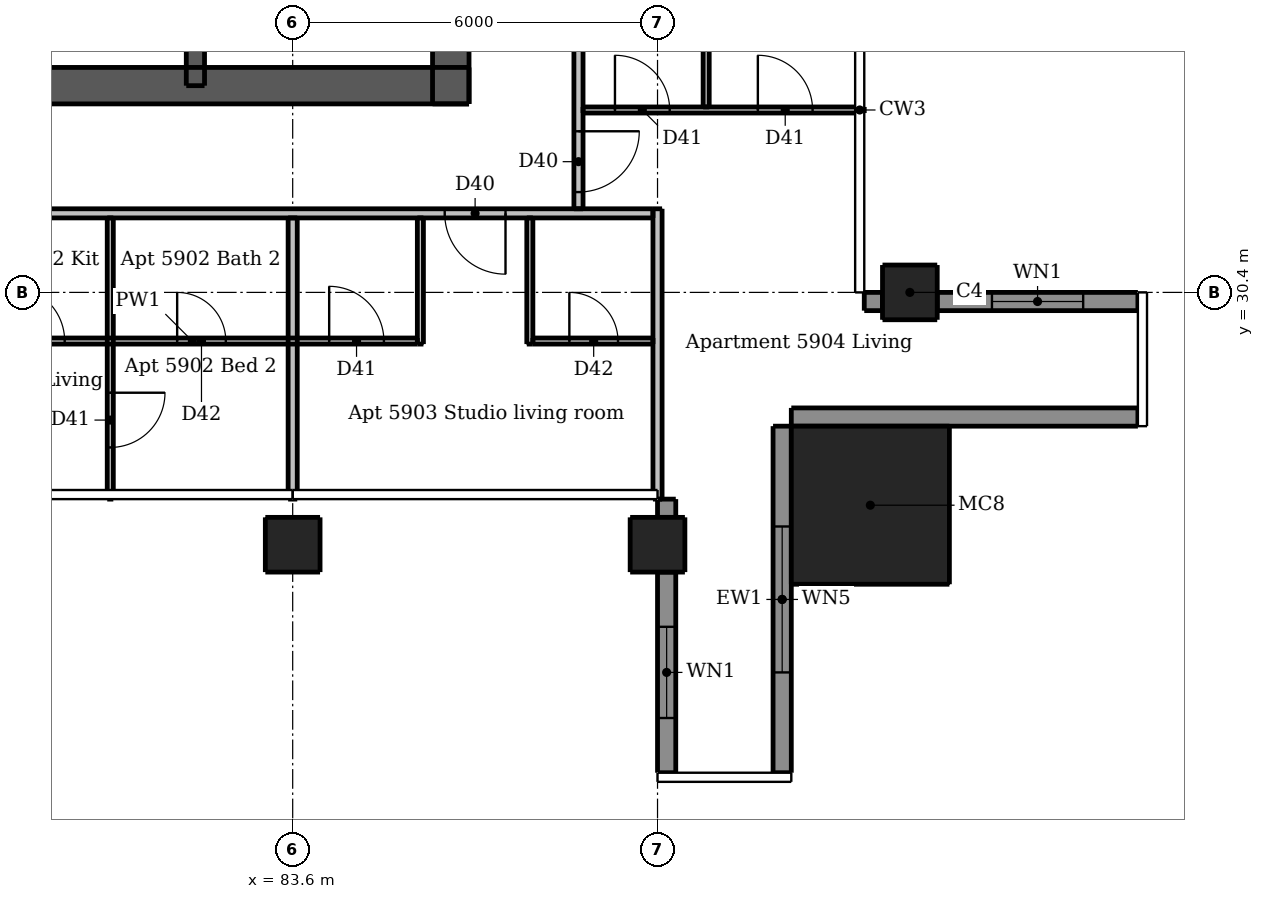
"""IFC4 building model, lengths in metres.
Left out: names, types, materials, properties, quantities, classifications, styles, units other than length and angle.
Written with IfcOpenShell. Run it as: python <this file> out.ifc"""

import sys

from ifc_helpers import new_model, si_unit, direction, frame, frame_2d, origin, origin_2d, place, context, subcontext, project, spatial, rectangle, extrude, element, fill, save


model = new_model("IFC4")
c1 = context("Model", 3, precision=1e-05, world=origin(), true_north=direction((0.0, 1.0)))
c2 = subcontext(c1, "Body", "Model", "MODEL_VIEW")
j1 = project(units=[si_unit("LENGTHUNIT", "METRE"), si_unit("PLANEANGLEUNIT", "RADIAN")], contexts=[c1])
p1 = place(None, origin())
s1 = spatial("IfcSite", under=j1, at=p1, CompositionType="ELEMENT")
p2 = place(p1, origin())
s2 = spatial("IfcBuilding", under=s1, at=p2, CompositionType="ELEMENT")
p3 = place(p2, frame((0.0, 0.0, 220.0)))
s3 = spatial("IfcBuildingStorey", under=s2, at=p3, CompositionType="ELEMENT", Elevation=220.0)
p4 = place(p3, frame((62.5, 33.8, 0.0), z_axis=(0.0, 0.0, 1.0), x_axis=(1.0, 0.0, 0.0)))
e1 = element("IfcWall", 1, at=p4, inside=s3, PredefinedType="SHEAR", context=c2, shape_type="SweptSolid", body=[
    extrude(rectangle(XDim=24.0, YDim=0.6, at=frame_2d((12.0, 0.0))), origin(), (0.0, 0.0, 1.0), 3.05),
])
p5 = place(p4, frame((1.925, 0.0, 0.0)))
e2 = element("IfcOpeningElement", 2, at=p5, cuts=e1, PredefinedType="OPENING", context=c2, shape_type="SweptSolid", body=[
    extrude(rectangle(XDim=1.1, YDim=2.1, at=frame_2d((0.55, 1.05))), frame((0.0, 0.31, 0.0), z_axis=(0.0, -1.0, 0.0), x_axis=(1.0, 0.0, 0.0)), (0.0, 0.0, 1.0), 0.62),
])
p6 = place(p4, frame((20.975, 0.0, 0.0)))
e3 = element("IfcOpeningElement", 3, at=p6, cuts=e1, PredefinedType="OPENING", context=c2, shape_type="SweptSolid", body=[
    extrude(rectangle(XDim=1.1, YDim=2.1, at=frame_2d((0.55, 1.05))), frame((0.0, 0.31, 0.0), z_axis=(0.0, -1.0, 0.0), x_axis=(1.0, 0.0, 0.0)), (0.0, 0.0, 1.0), 0.62),
])
p7 = place(p4, frame((8.0, 0.0, 0.0)))
e4 = element("IfcOpeningElement", 4, at=p7, cuts=e1, PredefinedType="OPENING", context=c2, shape_type="SweptSolid", body=[
    extrude(rectangle(XDim=1.1, YDim=2.1, at=frame_2d((0.55, 1.05))), frame((0.0, 0.31, 0.0), z_axis=(0.0, -1.0, 0.0), x_axis=(1.0, 0.0, 0.0)), (0.0, 0.0, 1.0), 0.62),
])
p8 = place(p4, frame((17.512, 0.0, 0.0)))
e5 = element("IfcOpeningElement", 5, at=p8, cuts=e1, PredefinedType="OPENING", context=c2, shape_type="SweptSolid", body=[
    extrude(rectangle(XDim=0.9, YDim=2.1, at=frame_2d((0.45, 1.05))), frame((0.0, 0.31, 0.0), z_axis=(0.0, -1.0, 0.0), x_axis=(1.0, 0.0, 0.0)), (0.0, 0.0, 1.0), 0.62),
])
p9 = place(p3, frame((86.2, 33.5, 0.0), z_axis=(0.0, 0.0, 1.0), x_axis=(0.0, 1.0, 0.0)))
e6 = element("IfcWall", 6, at=p9, inside=s3, PredefinedType="SHEAR", context=c2, shape_type="SweptSolid", body=[
    extrude(rectangle(XDim=24.0, YDim=0.6, at=frame_2d((12.0, 0.0))), origin(), (0.0, 0.0, 1.0), 3.05),
])
p10 = place(p9, frame((11.2, 0.0, 0.0)))
e7 = element("IfcOpeningElement", 7, at=p10, cuts=e6, PredefinedType="OPENING", context=c2, shape_type="SweptSolid", body=[
    extrude(rectangle(XDim=1.6, YDim=2.1, at=frame_2d((0.8, 1.05))), frame((0.0, 0.31, 0.0), z_axis=(0.0, -1.0, 0.0), x_axis=(1.0, 0.0, 0.0)), (0.0, 0.0, 1.0), 0.62),
])
p11 = place(p3, frame((82.0, 33.8, 0.0), z_axis=(0.0, 0.0, 1.0), x_axis=(0.0, 1.0, 0.0)))
e8 = element("IfcWall", 8, at=p11, inside=s3, PredefinedType="SHEAR", context=c2, shape_type="SweptSolid", body=[
    extrude(rectangle(XDim=10.1, YDim=0.3, at=frame_2d((5.05, 0.0))), origin(), (0.0, 0.0, 1.0), 3.05),
])
for number, where, z_axis, x_axis in (
    (9, (83.6, 26.25, 0.0), (0.0, 0.0, 1.0), (1.0, 0.0, 0.0)),
    (10, (89.6, 26.25, 0.0), (0.0, 0.0, 1.0), (1.0, 0.0, 0.0)),
    (11, (93.75, 30.4, 0.0), (0.0, 0.0, 1.0), (1.0, 0.0, 0.0)),
):
    element("IfcColumn", number, at=place(p3, frame(where, z_axis=z_axis, x_axis=x_axis)), inside=s3, PredefinedType="COLUMN", context=c2, shape_type="SweptSolid", body=[
        extrude(rectangle(XDim=0.9, YDim=0.9, at=origin_2d()), origin(), (0.0, 0.0, 1.0), 3.05),
    ])
p12 = place(p3, frame((93.1, 26.9, 0.0), z_axis=(0.0, 0.0, 1.0), x_axis=(1.0, 0.0, 0.0)))
e12 = element("IfcColumn", 12, at=p12, inside=s3, PredefinedType="COLUMN", context=c2, shape_type="SweptSolid", body=[
    extrude(rectangle(XDim=2.6, YDim=2.6, at=origin_2d()), origin(), (0.0, 0.0, 1.0), 3.3),
])
p13 = place(p3, frame((89.75, 27.0, 0.0), z_axis=(0.0, 0.0, 1.0), x_axis=(0.0, -1.0, 0.0)))
e13 = element("IfcWall", 13, at=p13, inside=s3, PredefinedType="SOLIDWALL", context=c2, shape_type="SweptSolid", body=[
    extrude(rectangle(XDim=0.3, YDim=0.3, at=frame_2d((0.15, 0.0))), origin(), (0.0, 0.0, 1.0), 3.05),
])
p14 = place(p3, frame((89.75, 25.8, 0.0), z_axis=(0.0, 0.0, 1.0), x_axis=(0.0, -1.0, 0.0)))
e14 = element("IfcWall", 14, at=p14, inside=s3, PredefinedType="SOLIDWALL", context=c2, shape_type="SweptSolid", body=[
    extrude(rectangle(XDim=3.3, YDim=0.3, at=frame_2d((1.65, 0.0))), origin(), (0.0, 0.0, 1.0), 3.05),
])
p15 = place(p14, frame((0.9, 0.0, 0.9)))
e15 = element("IfcOpeningElement", 15, at=p15, cuts=e14, PredefinedType="OPENING", context=c2, shape_type="SweptSolid", body=[
    extrude(rectangle(XDim=1.5, YDim=1.5, at=frame_2d((0.75, 0.75))), frame((0.0, 0.16, 0.0), z_axis=(0.0, -1.0, 0.0), x_axis=(1.0, 0.0, 0.0)), (0.0, 0.0, 1.0), 0.32),
])
p16 = place(p3, frame((91.65, 22.5, 0.0), z_axis=(0.0, 0.0, 1.0), x_axis=(0.0, 1.0, 0.0)))
e16 = element("IfcWall", 16, at=p16, inside=s3, PredefinedType="SOLIDWALL", context=c2, shape_type="SweptSolid", body=[
    extrude(rectangle(XDim=5.7, YDim=0.3, at=frame_2d((2.85, 0.0))), origin(), (0.0, 0.0, 1.0), 3.05),
])
p17 = place(p16, frame((1.65, 0.0, 0.15)))
e17 = element("IfcOpeningElement", 17, at=p17, cuts=e16, PredefinedType="OPENING", context=c2, shape_type="SweptSolid", body=[
    extrude(rectangle(XDim=2.4, YDim=2.1, at=frame_2d((1.2, 1.05))), frame((0.0, 0.16, 0.0), z_axis=(0.0, -1.0, 0.0), x_axis=(1.0, 0.0, 0.0)), (0.0, 0.0, 1.0), 0.32),
])
p18 = place(p3, frame((91.8, 28.35, 0.0), z_axis=(0.0, 0.0, 1.0), x_axis=(1.0, 0.0, 0.0)))
e18 = element("IfcWall", 18, at=p18, inside=s3, PredefinedType="SOLIDWALL", context=c2, shape_type="SweptSolid", body=[
    extrude(rectangle(XDim=5.7, YDim=0.3, at=frame_2d((2.85, 0.0))), origin(), (0.0, 0.0, 1.0), 3.05),
])
p19 = place(p3, frame((97.5, 30.25, 0.0), z_axis=(0.0, 0.0, 1.0), x_axis=(-1.0, 0.0, 0.0)))
e19 = element("IfcWall", 19, at=p19, inside=s3, PredefinedType="SOLIDWALL", context=c2, shape_type="SweptSolid", body=[
    extrude(rectangle(XDim=3.3, YDim=0.3, at=frame_2d((1.65, 0.0))), origin(), (0.0, 0.0, 1.0), 3.05),
])
p20 = place(p19, frame((0.9, 0.0, 0.9)))
e20 = element("IfcOpeningElement", 20, at=p20, cuts=e19, PredefinedType="OPENING", context=c2, shape_type="SweptSolid", body=[
    extrude(rectangle(XDim=1.5, YDim=1.5, at=frame_2d((0.75, 0.75))), frame((0.0, 0.16, 0.0), z_axis=(0.0, -1.0, 0.0), x_axis=(1.0, 0.0, 0.0)), (0.0, 0.0, 1.0), 0.32),
])
p21 = place(p3, frame((93.3, 30.25, 0.0), z_axis=(0.0, 0.0, 1.0), x_axis=(-1.0, 0.0, 0.0)))
e21 = element("IfcWall", 21, at=p21, inside=s3, PredefinedType="SOLIDWALL", context=c2, shape_type="SweptSolid", body=[
    extrude(rectangle(XDim=0.3, YDim=0.3, at=frame_2d((0.15, 0.0))), origin(), (0.0, 0.0, 1.0), 3.05),
])
p22 = place(p3, frame((80.6, 31.625, 0.0), z_axis=(0.0, 0.0, 1.0), x_axis=(0.0, -1.0, 0.0)))
e22 = element("IfcWall", 22, at=p22, inside=s3, PredefinedType="PARTITIONING", context=c2, shape_type="SweptSolid", body=[
    extrude(rectangle(XDim=4.625, YDim=0.1, at=frame_2d((2.312, 0.0))), origin(), (0.0, 0.0, 1.0), 3.05),
])
p23 = place(p22, frame((2.875, 0.0, 0.0)))
e23 = element("IfcOpeningElement", 23, at=p23, cuts=e22, PredefinedType="OPENING", context=c2, shape_type="SweptSolid", body=[
    extrude(rectangle(XDim=0.9, YDim=2.1, at=frame_2d((0.45, 1.05))), frame((0.0, 0.06, 0.0), z_axis=(0.0, -1.0, 0.0), x_axis=(1.0, 0.0, 0.0)), (0.0, 0.0, 1.0), 0.12),
])
for number, where, z_axis, x_axis in (
    (24, (85.7, 29.55, 0.0), (0.0, 0.0, 1.0), (0.0, 1.0, 0.0)),
    (25, (87.5, 29.55, 0.0), (0.0, 0.0, 1.0), (0.0, 1.0, 0.0)),
):
    element("IfcWall", number, at=place(p3, frame(where, z_axis=z_axis, x_axis=x_axis)), inside=s3, PredefinedType="PARTITIONING", context=c2, shape_type="SweptSolid", body=[
        extrude(rectangle(XDim=2.075, YDim=0.1, at=frame_2d((1.038, 0.0))), origin(), (0.0, 0.0, 1.0), 3.05),
    ])
p24 = place(p3, frame((90.4, 33.45, 0.0), z_axis=(0.0, 0.0, 1.0), x_axis=(0.0, 1.0, 0.0)))
e26 = element("IfcWall", 26, at=p24, inside=s3, PredefinedType="PARTITIONING", context=c2, shape_type="SweptSolid", body=[
    extrude(rectangle(XDim=9.0, YDim=0.1, at=frame_2d((4.5, 0.0))), origin(), (0.0, 0.0, 1.0), 3.05),
])
p25 = place(p24, frame((3.75, 0.0, 0.0)))
e27 = element("IfcOpeningElement", 27, at=p25, cuts=e26, PredefinedType="OPENING", context=c2, shape_type="SweptSolid", body=[
    extrude(rectangle(XDim=0.8, YDim=2.1, at=frame_2d((0.4, 1.05))), frame((0.0, 0.06, 0.0), z_axis=(0.0, -1.0, 0.0), x_axis=(1.0, 0.0, 0.0)), (0.0, 0.0, 1.0), 0.12),
])
p26 = place(p24, frame((7.0, 0.0, 0.0)))
e28 = element("IfcOpeningElement", 28, at=p26, cuts=e26, PredefinedType="OPENING", context=c2, shape_type="SweptSolid", body=[
    extrude(rectangle(XDim=0.9, YDim=2.1, at=frame_2d((0.45, 1.05))), frame((0.0, 0.06, 0.0), z_axis=(0.0, -1.0, 0.0), x_axis=(1.0, 0.0, 0.0)), (0.0, 0.0, 1.0), 0.12),
])
p27 = place(p3, frame((88.375, 33.4, 0.0), z_axis=(0.0, 0.0, 1.0), x_axis=(1.0, 0.0, 0.0)))
e29 = element("IfcWall", 29, at=p27, inside=s3, PredefinedType="PARTITIONING", context=c2, shape_type="SweptSolid", body=[
    extrude(rectangle(XDim=4.625, YDim=0.1, at=frame_2d((2.312, 0.0))), origin(), (0.0, 0.0, 1.0), 3.05),
])
p28 = place(p27, frame((0.525, 0.0, 0.0)))
e30 = element("IfcOpeningElement", 30, at=p28, cuts=e29, PredefinedType="OPENING", context=c2, shape_type="SweptSolid", body=[
    extrude(rectangle(XDim=0.9, YDim=2.1, at=frame_2d((0.45, 1.05))), frame((0.0, 0.06, 0.0), z_axis=(0.0, -1.0, 0.0), x_axis=(1.0, 0.0, 0.0)), (0.0, 0.0, 1.0), 0.12),
])
p29 = place(p27, frame((2.875, 0.0, 0.0)))
e31 = element("IfcOpeningElement", 31, at=p29, cuts=e29, PredefinedType="OPENING", context=c2, shape_type="SweptSolid", body=[
    extrude(rectangle(XDim=0.9, YDim=2.1, at=frame_2d((0.45, 1.05))), frame((0.0, 0.06, 0.0), z_axis=(0.0, -1.0, 0.0), x_axis=(1.0, 0.0, 0.0)), (0.0, 0.0, 1.0), 0.12),
])
p30 = place(p3, frame((78.25, 29.6, 0.0), z_axis=(0.0, 0.0, 1.0), x_axis=(1.0, 0.0, 0.0)))
e32 = element("IfcWall", 32, at=p30, inside=s3, PredefinedType="PARTITIONING", context=c2, shape_type="SweptSolid", body=[
    extrude(rectangle(XDim=7.4, YDim=0.1, at=frame_2d((3.7, 0.0))), origin(), (0.0, 0.0, 1.0), 3.05),
])
p31 = place(p30, frame((0.7, 0.0, 0.0)))
e33 = element("IfcOpeningElement", 33, at=p31, cuts=e32, PredefinedType="OPENING", context=c2, shape_type="SweptSolid", body=[
    extrude(rectangle(XDim=0.9, YDim=2.1, at=frame_2d((0.45, 1.05))), frame((0.0, 0.06, 0.0), z_axis=(0.0, -1.0, 0.0), x_axis=(1.0, 0.0, 0.0)), (0.0, 0.0, 1.0), 0.12),
])
p32 = place(p30, frame((3.45, 0.0, 0.0)))
e34 = element("IfcOpeningElement", 34, at=p32, cuts=e32, PredefinedType="OPENING", context=c2, shape_type="SweptSolid", body=[
    extrude(rectangle(XDim=0.8, YDim=2.1, at=frame_2d((0.4, 1.05))), frame((0.0, 0.06, 0.0), z_axis=(0.0, -1.0, 0.0), x_axis=(1.0, 0.0, 0.0)), (0.0, 0.0, 1.0), 0.12),
])
p33 = place(p30, frame((5.95, 0.0, 0.0)))
e35 = element("IfcOpeningElement", 35, at=p33, cuts=e32, PredefinedType="OPENING", context=c2, shape_type="SweptSolid", body=[
    extrude(rectangle(XDim=0.9, YDim=2.1, at=frame_2d((0.45, 1.05))), frame((0.0, 0.06, 0.0), z_axis=(0.0, -1.0, 0.0), x_axis=(1.0, 0.0, 0.0)), (0.0, 0.0, 1.0), 0.12),
])
p34 = place(p3, frame((87.55, 29.6, 0.0), z_axis=(0.0, 0.0, 1.0), x_axis=(1.0, 0.0, 0.0)))
e36 = element("IfcWall", 36, at=p34, inside=s3, PredefinedType="PARTITIONING", context=c2, shape_type="SweptSolid", body=[
    extrude(rectangle(XDim=1.975, YDim=0.1, at=frame_2d((0.987, 0.0))), origin(), (0.0, 0.0, 1.0), 3.05),
])
p35 = place(p34, frame((0.6, 0.0, 0.0)))
e37 = element("IfcOpeningElement", 37, at=p35, cuts=e36, PredefinedType="OPENING", context=c2, shape_type="SweptSolid", body=[
    extrude(rectangle(XDim=0.8, YDim=2.1, at=frame_2d((0.4, 1.05))), frame((0.0, 0.06, 0.0), z_axis=(0.0, -1.0, 0.0), x_axis=(1.0, 0.0, 0.0)), (0.0, 0.0, 1.0), 0.12),
])
p36 = place(p3, frame((83.6, 27.0, 0.0), z_axis=(0.0, 0.0, 1.0), x_axis=(0.0, 1.0, 0.0)))
e38 = element("IfcWall", 38, at=p36, inside=s3, PredefinedType="PARTITIONING", context=c2, shape_type="SweptSolid", body=[
    extrude(rectangle(XDim=4.625, YDim=0.15, at=frame_2d((2.312, 0.0))), origin(), (0.0, 0.0, 1.0), 2.59),
])
p37 = place(p3, frame((88.3, 61.175, 0.0), z_axis=(0.0, 0.0, 1.0), x_axis=(0.0, -1.0, 0.0)))
e39 = element("IfcWall", 39, at=p37, inside=s3, PredefinedType="PARTITIONING", context=c2, shape_type="SweptSolid", body=[
    extrude(rectangle(XDim=29.4, YDim=0.15, at=frame_2d((14.7, 0.0))), origin(), (0.0, 0.0, 1.0), 3.05),
])
p38 = place(p37, frame((28.125, 0.0, 0.0)))
e40 = element("IfcOpeningElement", 40, at=p38, cuts=e39, PredefinedType="OPENING", context=c2, shape_type="SweptSolid", body=[
    extrude(rectangle(XDim=1.0, YDim=2.1, at=frame_2d((0.5, 1.05))), frame((0.0, 0.085, 0.0), z_axis=(0.0, -1.0, 0.0), x_axis=(1.0, 0.0, 0.0)), (0.0, 0.0, 1.0), 0.17),
])
p39 = place(p37, frame((15.275, 0.0, 0.0)))
e41 = element("IfcOpeningElement", 41, at=p39, cuts=e39, PredefinedType="OPENING", context=c2, shape_type="SweptSolid", body=[
    extrude(rectangle(XDim=1.0, YDim=2.1, at=frame_2d((0.5, 1.05))), frame((0.0, 0.085, 0.0), z_axis=(0.0, -1.0, 0.0), x_axis=(1.0, 0.0, 0.0)), (0.0, 0.0, 1.0), 0.17),
])
p40 = place(p37, frame((5.075, 0.0, 0.0)))
e42 = element("IfcOpeningElement", 42, at=p40, cuts=e39, PredefinedType="OPENING", context=c2, shape_type="SweptSolid", body=[
    extrude(rectangle(XDim=1.0, YDim=2.1, at=frame_2d((0.5, 1.05))), frame((0.0, 0.085, 0.0), z_axis=(0.0, -1.0, 0.0), x_axis=(1.0, 0.0, 0.0)), (0.0, 0.0, 1.0), 0.17),
])
p41 = place(p3, frame((89.6, 27.0, 0.0), z_axis=(0.0, 0.0, 1.0), x_axis=(0.0, 1.0, 0.0)))
e43 = element("IfcWall", 43, at=p41, inside=s3, PredefinedType="PARTITIONING", context=c2, shape_type="SweptSolid", body=[
    extrude(rectangle(XDim=4.775, YDim=0.15, at=frame_2d((2.387, 0.0))), origin(), (0.0, 0.0, 1.0), 2.516),
])
p42 = place(p3, frame((89.525, 31.7, 0.0), z_axis=(0.0, 0.0, 1.0), x_axis=(-1.0, 0.0, 0.0)))
e44 = element("IfcWall", 44, at=p42, inside=s3, PredefinedType="PARTITIONING", context=c2, shape_type="SweptSolid", body=[
    extrude(rectangle(XDim=30.55, YDim=0.15, at=frame_2d((15.275, 0.0))), origin(), (0.0, 0.0, 1.0), 3.05),
])
p43 = place(p42, frame((28.275, 0.0, 0.0)))
e45 = element("IfcOpeningElement", 45, at=p43, cuts=e44, PredefinedType="OPENING", context=c2, shape_type="SweptSolid", body=[
    extrude(rectangle(XDim=1.0, YDim=2.1, at=frame_2d((0.5, 1.05))), frame((0.0, 0.085, 0.0), z_axis=(0.0, -1.0, 0.0), x_axis=(1.0, 0.0, 0.0)), (0.0, 0.0, 1.0), 0.17),
])
p44 = place(p42, frame((12.625, 0.0, 0.0)))
e46 = element("IfcOpeningElement", 46, at=p44, cuts=e44, PredefinedType="OPENING", context=c2, shape_type="SweptSolid", body=[
    extrude(rectangle(XDim=1.0, YDim=2.1, at=frame_2d((0.5, 1.05))), frame((0.0, 0.085, 0.0), z_axis=(0.0, -1.0, 0.0), x_axis=(1.0, 0.0, 0.0)), (0.0, 0.0, 1.0), 0.17),
])
p45 = place(p42, frame((2.425, 0.0, 0.0)))
e47 = element("IfcOpeningElement", 47, at=p45, cuts=e44, PredefinedType="OPENING", context=c2, shape_type="SweptSolid", body=[
    extrude(rectangle(XDim=1.0, YDim=2.1, at=frame_2d((0.5, 1.05))), frame((0.0, 0.085, 0.0), z_axis=(0.0, -1.0, 0.0), x_axis=(1.0, 0.0, 0.0)), (0.0, 0.0, 1.0), 0.17),
])
p46 = place(p15, origin())
e48 = element("IfcWindow", 48, at=p46, inside=s3, PartitioningType="DOUBLE_PANEL_VERTICAL", PredefinedType="WINDOW", context=c2, shape_type="SweptSolid", body=[
    extrude(rectangle(XDim=1.5, YDim=1.5, at=frame_2d((0.75, 0.75))), frame((0.0, 0.03, 0.0), z_axis=(0.0, -1.0, 0.0), x_axis=(1.0, 0.0, 0.0)), (0.0, 0.0, 1.0), 0.06),
])
fill(e15, e48)
p47 = place(p17, origin())
e49 = element("IfcWindow", 49, at=p47, inside=s3, PartitioningType="DOUBLE_PANEL_VERTICAL", PredefinedType="WINDOW", context=c2, shape_type="SweptSolid", body=[
    extrude(rectangle(XDim=2.4, YDim=2.1, at=frame_2d((1.2, 1.05))), frame((0.0, 0.03, 0.0), z_axis=(0.0, -1.0, 0.0), x_axis=(1.0, 0.0, 0.0)), (0.0, 0.0, 1.0), 0.06),
])
fill(e17, e49)
p48 = place(p20, origin())
e50 = element("IfcWindow", 50, at=p48, inside=s3, PartitioningType="DOUBLE_PANEL_VERTICAL", PredefinedType="WINDOW", context=c2, shape_type="SweptSolid", body=[
    extrude(rectangle(XDim=1.5, YDim=1.5, at=frame_2d((0.75, 0.75))), frame((0.0, 0.03, 0.0), z_axis=(0.0, -1.0, 0.0), x_axis=(1.0, 0.0, 0.0)), (0.0, 0.0, 1.0), 0.06),
])
fill(e20, e50)
p49 = place(p6, origin())
e51 = element("IfcDoor", 51, at=p49, inside=s3, OperationType="SINGLE_SWING_RIGHT", PredefinedType="DOOR", context=c2, shape_type="SweptSolid", body=[
    extrude(rectangle(XDim=1.1, YDim=2.1, at=frame_2d((0.55, 1.05))), frame((0.0, 0.288, 0.0), z_axis=(0.0, -1.0, 0.0), x_axis=(1.0, 0.0, 0.0)), (0.0, 0.0, 1.0), 0.05),
])
fill(e3, e51)
p50 = place(p8, origin())
e52 = element("IfcDoor", 52, at=p50, inside=s3, OperationType="SINGLE_SWING_LEFT", PredefinedType="DOOR", context=c2, shape_type="SweptSolid", body=[
    extrude(rectangle(XDim=0.9, YDim=2.1, at=frame_2d((0.45, 1.05))), frame((0.0, 0.288, 0.0), z_axis=(0.0, -1.0, 0.0), x_axis=(1.0, 0.0, 0.0)), (0.0, 0.0, 1.0), 0.05),
])
fill(e5, e52)
p51 = place(p31, origin())
e53 = element("IfcDoor", 53, at=p51, inside=s3, OperationType="SINGLE_SWING_LEFT", PredefinedType="DOOR", context=c2, shape_type="SweptSolid", body=[
    extrude(rectangle(XDim=0.9, YDim=2.1, at=frame_2d((0.45, 1.05))), frame((0.0, 0.025, 0.0), z_axis=(0.0, -1.0, 0.0), x_axis=(1.0, 0.0, 0.0)), (0.0, 0.0, 1.0), 0.05),
])
fill(e33, e53)
p52 = place(p23, origin())
e54 = element("IfcDoor", 54, at=p52, inside=s3, OperationType="SINGLE_SWING_LEFT", PredefinedType="DOOR", context=c2, shape_type="SweptSolid", body=[
    extrude(rectangle(XDim=0.9, YDim=2.1, at=frame_2d((0.45, 1.05))), frame((0.0, 0.025, 0.0), z_axis=(0.0, -1.0, 0.0), x_axis=(1.0, 0.0, 0.0)), (0.0, 0.0, 1.0), 0.05),
])
fill(e23, e54)
p53 = place(p32, origin())
e55 = element("IfcDoor", 55, at=p53, inside=s3, OperationType="SINGLE_SWING_LEFT", PredefinedType="DOOR", context=c2, shape_type="SweptSolid", body=[
    extrude(rectangle(XDim=0.8, YDim=2.1, at=frame_2d((0.4, 1.05))), frame((0.0, 0.025, 0.0), z_axis=(0.0, -1.0, 0.0), x_axis=(1.0, 0.0, 0.0)), (0.0, 0.0, 1.0), 0.05),
])
fill(e34, e55)
p54 = place(p45, origin())
e56 = element("IfcDoor", 56, at=p54, inside=s3, OperationType="SINGLE_SWING_LEFT", PredefinedType="DOOR", context=c2, shape_type="SweptSolid", body=[
    extrude(rectangle(XDim=1.0, YDim=2.1, at=frame_2d((0.5, 1.05))), frame((0.0, 0.025, 0.0), z_axis=(0.0, -1.0, 0.0), x_axis=(1.0, 0.0, 0.0)), (0.0, 0.0, 1.0), 0.05),
])
fill(e47, e56)
p55 = place(p33, origin())
e57 = element("IfcDoor", 57, at=p55, inside=s3, OperationType="SINGLE_SWING_LEFT", PredefinedType="DOOR", context=c2, shape_type="SweptSolid", body=[
    extrude(rectangle(XDim=0.9, YDim=2.1, at=frame_2d((0.45, 1.05))), frame((0.0, 0.025, 0.0), z_axis=(0.0, -1.0, 0.0), x_axis=(1.0, 0.0, 0.0)), (0.0, 0.0, 1.0), 0.05),
])
fill(e35, e57)
p56 = place(p35, origin())
e58 = element("IfcDoor", 58, at=p56, inside=s3, OperationType="SINGLE_SWING_LEFT", PredefinedType="DOOR", context=c2, shape_type="SweptSolid", body=[
    extrude(rectangle(XDim=0.8, YDim=2.1, at=frame_2d((0.4, 1.05))), frame((0.0, 0.025, 0.0), z_axis=(0.0, -1.0, 0.0), x_axis=(1.0, 0.0, 0.0)), (0.0, 0.0, 1.0), 0.05),
])
fill(e37, e58)
p57 = place(p38, origin())
e59 = element("IfcDoor", 59, at=p57, inside=s3, OperationType="SINGLE_SWING_LEFT", PredefinedType="DOOR", context=c2, shape_type="SweptSolid", body=[
    extrude(rectangle(XDim=1.0, YDim=2.1, at=frame_2d((0.5, 1.05))), frame((0.0, 0.025, 0.0), z_axis=(0.0, -1.0, 0.0), x_axis=(1.0, 0.0, 0.0)), (0.0, 0.0, 1.0), 0.05),
])
fill(e40, e59)
p58 = place(p28, origin())
e60 = element("IfcDoor", 60, at=p58, inside=s3, OperationType="SINGLE_SWING_LEFT", PredefinedType="DOOR", context=c2, shape_type="SweptSolid", body=[
    extrude(rectangle(XDim=0.9, YDim=2.1, at=frame_2d((0.45, 1.05))), frame((0.0, 0.025, 0.0), z_axis=(0.0, -1.0, 0.0), x_axis=(1.0, 0.0, 0.0)), (0.0, 0.0, 1.0), 0.05),
])
fill(e30, e60)
p59 = place(p29, origin())
e61 = element("IfcDoor", 61, at=p59, inside=s3, OperationType="SINGLE_SWING_LEFT", PredefinedType="DOOR", context=c2, shape_type="SweptSolid", body=[
    extrude(rectangle(XDim=0.9, YDim=2.1, at=frame_2d((0.45, 1.05))), frame((0.0, 0.025, 0.0), z_axis=(0.0, -1.0, 0.0), x_axis=(1.0, 0.0, 0.0)), (0.0, 0.0, 1.0), 0.05),
])
fill(e31, e61)
save(model, sys.argv[1])
